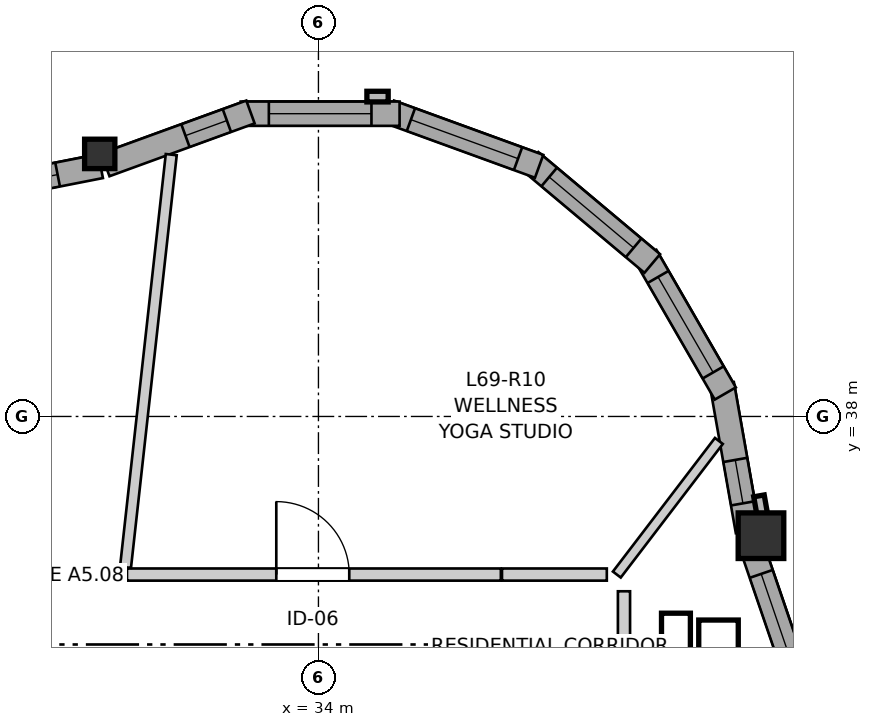
"""IFC4 building model, lengths in metres.
Left out: names, types, materials, properties, quantities, classifications, styles, units other than length and angle.
Written with IfcOpenShell. Run it as: python <this file> out.ifc"""

import sys

from ifc_helpers import new_model, si_unit, direction, frame, frame_2d, origin, origin_2d, place, context, subcontext, project, spatial, rectangle, i_section, extrude, source, transform, mapped, element, fill, save


model = new_model("IFC4")
c1 = context("Model", 3, precision=1e-05, world=origin(), true_north=direction((0.0, 1.0)))
c2 = subcontext(c1, "Body", "Model", "MODEL_VIEW")
j1 = project(units=[si_unit("LENGTHUNIT", "METRE"), si_unit("PLANEANGLEUNIT", "RADIAN")], contexts=[c1])
p1 = place(None, origin())
s1 = spatial("IfcSite", under=j1, at=p1, CompositionType="ELEMENT")
p2 = place(p1, origin())
s2 = spatial("IfcBuilding", under=s1, at=p2, CompositionType="ELEMENT")
p3 = place(p2, frame((0.0, 0.0, 230.8)))
s3 = spatial("IfcBuildingStorey", under=s2, at=p3, CompositionType="ELEMENT", Elevation=230.8)
m1 = source(origin(), c2, "Body", "SweptSolid", [
    extrude(rectangle(XDim=0.6, YDim=0.6, at=origin_2d()), origin(), (0.0, 0.0, 1.0), 2.96),
])
p4 = place(p3, frame((39.823, 36.431, 0.0), z_axis=(0.0, 0.0, 1.0), x_axis=(1.0, 0.0, 0.0)))
e1 = element("IfcColumn", 1, at=p4, inside=s3, PredefinedType="COLUMN", context=c2, shape_type="MappedRepresentation", body=[
    mapped(m1, transform((0.0, 0.0, 0.0), x_axis=(1.0, 0.0, 0.0), y_axis=(0.0, 1.0, 0.0), z_axis=(0.0, 0.0, 1.0), scale=1.0)),
])
m2 = source(origin(), c2, "Body", "SweptSolid", [
    extrude(i_section(OverallWidth=0.398, OverallDepth=0.387, WebThickness=0.019, FlangeThickness=0.03, FilletRadius=0.015, at=origin_2d()), origin(), (0.0, 0.0, 1.0), 2.96),
])
p5 = place(p3, frame((31.123, 41.454, 0.0), z_axis=(0.0, 0.0, 1.0), x_axis=(1.0, 0.0, 0.0)))
e2 = element("IfcColumn", 2, at=p5, inside=s3, PredefinedType="PILASTER", context=c2, shape_type="MappedRepresentation", body=[
    mapped(m2, transform((0.0, 0.0, 0.0), x_axis=(1.0, 0.0, 0.0), y_axis=(0.0, 1.0, 0.0), z_axis=(0.0, 0.0, 1.0), scale=1.0)),
])
p6 = place(p3, frame((40.397, 34.257, 0.0), z_axis=(0.0, 0.0, 1.0), x_axis=(-0.323634249216, 0.9461822619, 0.0)))
e3 = element("IfcWall", 3, at=p6, inside=s3, PredefinedType="SOLIDWALL", context=c2, shape_type="SweptSolid", body=[
    extrude(rectangle(XDim=2.153, YDim=0.32, at=frame_2d((1.077, 0.0))), origin(), (0.0, 0.0, 1.0), 2.58),
])
p7 = place(p6, frame((0.316, 0.0, 0.82)))
e4 = element("IfcOpeningElement", 4, at=p7, cuts=e3, PredefinedType="OPENING", context=c2, shape_type="SweptSolid", body=[
    extrude(rectangle(XDim=1.45, YDim=1.25, at=frame_2d((0.725, 0.625))), frame((0.0, 0.17, 0.0), z_axis=(0.0, -1.0, 0.0), x_axis=(1.0, 0.0, 0.0)), (0.0, 0.0, 1.0), 0.34),
])
p8 = place(p3, frame((39.649, 36.492, 0.0), z_axis=(0.0, 0.0, 1.0), x_axis=(-0.173693060482, 0.984799837906, 0.0)))
e5 = element("IfcWall", 5, at=p8, inside=s3, PredefinedType="SOLIDWALL", context=c2, shape_type="SweptSolid", body=[
    extrude(rectangle(XDim=1.962, YDim=0.32, at=frame_2d((0.981, 0.0))), origin(), (0.0, 0.0, 1.0), 2.58),
])
p9 = place(p8, frame((0.371, 0.0, 0.82)))
e6 = element("IfcOpeningElement", 6, at=p9, cuts=e5, PredefinedType="OPENING", context=c2, shape_type="SweptSolid", body=[
    extrude(rectangle(XDim=0.58, YDim=1.35, at=frame_2d((0.29, 0.675))), frame((0.0, 0.17, 0.0), z_axis=(0.0, -1.0, 0.0), x_axis=(1.0, 0.0, 0.0)), (0.0, 0.0, 1.0), 0.34),
])
p10 = place(p3, frame((39.353, 38.302, 0.0), z_axis=(0.0, 0.0, 1.0), x_axis=(-0.49990781971, 0.866078617559, 0.0)))
e7 = element("IfcWall", 7, at=p10, inside=s3, PredefinedType="SOLIDWALL", context=c2, shape_type="SweptSolid", body=[
    extrude(rectangle(XDim=2.09, YDim=0.32, at=frame_2d((1.045, 0.0))), origin(), (0.0, 0.0, 1.0), 2.58),
])
p11 = place(p10, frame((0.32, 0.0, 0.82)))
e8 = element("IfcOpeningElement", 8, at=p11, cuts=e7, PredefinedType="OPENING", context=c2, shape_type="SweptSolid", body=[
    extrude(rectangle(XDim=1.45, YDim=1.25, at=frame_2d((0.725, 0.625))), frame((0.0, 0.17, 0.0), z_axis=(0.0, -1.0, 0.0), x_axis=(1.0, 0.0, 0.0)), (0.0, 0.0, 1.0), 0.34),
])
p12 = place(p3, frame((38.392, 40.012, 0.0), z_axis=(0.0, 0.0, 1.0), x_axis=(-0.766024572719, 0.642811289563, 0.0)))
e9 = element("IfcWall", 9, at=p12, inside=s3, PredefinedType="SOLIDWALL", context=c2, shape_type="SweptSolid", body=[
    extrude(rectangle(XDim=2.09, YDim=0.32, at=frame_2d((1.045, 0.0))), origin(), (0.0, 0.0, 1.0), 2.58),
])
p13 = place(p12, frame((0.32, 0.0, 0.82)))
e10 = element("IfcOpeningElement", 10, at=p13, cuts=e9, PredefinedType="OPENING", context=c2, shape_type="SweptSolid", body=[
    extrude(rectangle(XDim=1.45, YDim=1.25, at=frame_2d((0.725, 0.625))), frame((0.0, 0.17, 0.0), z_axis=(0.0, -1.0, 0.0), x_axis=(1.0, 0.0, 0.0)), (0.0, 0.0, 1.0), 0.34),
])
p14 = place(p3, frame((36.904, 41.291, 0.0), z_axis=(0.0, 0.0, 1.0), x_axis=(-0.939711556618, 0.341968113072, 0.0)))
e11 = element("IfcWall", 11, at=p14, inside=s3, PredefinedType="SOLIDWALL", context=c2, shape_type="SweptSolid", body=[
    extrude(rectangle(XDim=2.09, YDim=0.32, at=frame_2d((1.045, 0.0))), origin(), (0.0, 0.0, 1.0), 2.58),
])
p15 = place(p14, frame((0.295, 0.0, 0.82)))
e12 = element("IfcOpeningElement", 12, at=p15, cuts=e11, PredefinedType="OPENING", context=c2, shape_type="SweptSolid", body=[
    extrude(rectangle(XDim=1.5, YDim=1.45, at=frame_2d((0.75, 0.725))), frame((0.0, 0.17, 0.0), z_axis=(0.0, -1.0, 0.0), x_axis=(1.0, 0.0, 0.0)), (0.0, 0.0, 1.0), 0.34),
])
p16 = place(p3, frame((35.068, 41.983, 0.0), z_axis=(0.0, 0.0, 1.0), x_axis=(-1.0, 0.0, 0.0)))
e13 = element("IfcWall", 13, at=p16, inside=s3, PredefinedType="SOLIDWALL", context=c2, shape_type="SweptSolid", body=[
    extrude(rectangle(XDim=2.09, YDim=0.32, at=frame_2d((1.045, 0.0))), origin(), (0.0, 0.0, 1.0), 2.58),
])
p17 = place(p16, frame((0.37, 0.0, 0.82)))
e14 = element("IfcOpeningElement", 14, at=p17, cuts=e13, PredefinedType="OPENING", context=c2, shape_type="SweptSolid", body=[
    extrude(rectangle(XDim=1.35, YDim=1.45, at=frame_2d((0.675, 0.725))), frame((0.0, 0.17, 0.0), z_axis=(0.0, -1.0, 0.0), x_axis=(1.0, 0.0, 0.0)), (0.0, 0.0, 1.0), 0.34),
])
p18 = place(p3, frame((33.106, 42.006, 0.0), z_axis=(0.0, 0.0, 1.0), x_axis=(-0.939691662178, -0.342022777067, 0.0)))
e15 = element("IfcWall", 15, at=p18, inside=s3, PredefinedType="SOLIDWALL", context=c2, shape_type="SweptSolid", body=[
    extrude(rectangle(XDim=2.032, YDim=0.32, at=frame_2d((1.016, 0.0))), origin(), (0.0, 0.0, 1.0), 2.58),
])
p19 = place(p18, frame((0.33, 0.0, 0.82)))
e16 = element("IfcOpeningElement", 16, at=p19, cuts=e15, PredefinedType="OPENING", context=c2, shape_type="SweptSolid", body=[
    extrude(rectangle(XDim=0.58, YDim=1.35, at=frame_2d((0.29, 0.675))), frame((0.0, 0.17, 0.0), z_axis=(0.0, -1.0, 0.0), x_axis=(1.0, 0.0, 0.0)), (0.0, 0.0, 1.0), 0.34),
])
p20 = place(p3, frame((31.134, 41.293, 0.0), z_axis=(0.0, 0.0, 1.0), x_axis=(-0.981246594798, -0.19275663464, 0.0)))
e17 = element("IfcWall", 17, at=p20, inside=s3, PredefinedType="SOLIDWALL", context=c2, shape_type="SweptSolid", body=[
    extrude(rectangle(XDim=2.223, YDim=0.32, at=frame_2d((1.111, 0.0))), origin(), (0.0, 0.0, 1.0), 2.58),
])
p21 = place(p20, frame((0.576, 0.0, 0.82)))
e18 = element("IfcOpeningElement", 18, at=p21, cuts=e17, PredefinedType="OPENING", context=c2, shape_type="SweptSolid", body=[
    extrude(rectangle(XDim=1.05, YDim=1.45, at=frame_2d((0.525, 0.725))), frame((0.0, 0.17, 0.0), z_axis=(0.0, -1.0, 0.0), x_axis=(1.0, 0.0, 0.0)), (0.0, 0.0, 1.0), 0.34),
])
p22 = place(p3, frame((26.138, 35.92, 0.0), z_axis=(0.0, 0.0, 1.0), x_axis=(1.0, 0.0, 0.0)))
e19 = element("IfcWall", 19, at=p22, inside=s3, PredefinedType="PARTITIONING", context=c2, shape_type="SweptSolid", body=[
    extrude(rectangle(XDim=5.328, YDim=0.16, at=frame_2d((2.664, 0.0))), origin(), (0.0, 0.0, 1.0), 2.96),
])
p23 = place(p22, frame((2.185, 0.0, 0.0)))
e20 = element("IfcOpeningElement", 20, at=p23, cuts=e19, PredefinedType="OPENING", context=c2, shape_type="SweptSolid", body=[
    extrude(rectangle(XDim=0.96, YDim=2.1, at=frame_2d((0.48, 1.05))), frame((0.0, 0.09, 0.0), z_axis=(0.0, -1.0, 0.0), x_axis=(1.0, 0.0, 0.0)), (0.0, 0.0, 1.0), 0.18),
])
p24 = place(p3, frame((31.481, 35.92, 0.0), z_axis=(0.0, 0.0, 1.0), x_axis=(1.0, 0.0, 0.0)))
e21 = element("IfcWall", 21, at=p24, inside=s3, PredefinedType="PARTITIONING", context=c2, shape_type="SweptSolid", body=[
    extrude(rectangle(XDim=4.919, YDim=0.16, at=frame_2d((2.459, 0.0))), origin(), (0.0, 0.0, 1.0), 2.598),
])
p25 = place(p24, frame((1.965, 0.0, 0.0)))
e22 = element("IfcOpeningElement", 22, at=p25, cuts=e21, PredefinedType="OPENING", context=c2, shape_type="SweptSolid", body=[
    extrude(rectangle(XDim=0.96, YDim=2.1, at=frame_2d((0.48, 1.05))), frame((0.0, 0.09, 0.0), z_axis=(0.0, -1.0, 0.0), x_axis=(1.0, 0.0, 0.0)), (0.0, 0.0, 1.0), 0.18),
])
p26 = place(p3, frame((31.462, 36.016, 0.0), z_axis=(0.0, 0.0, 1.0), x_axis=(0.11018132109, 0.993911503346, 0.0)))
e23 = element("IfcWall", 23, at=p26, inside=s3, PredefinedType="PARTITIONING", context=c2, shape_type="SweptSolid", body=[
    extrude(rectangle(XDim=5.462, YDim=0.145, at=frame_2d((2.731, 0.0))), origin(), (0.0, 0.0, 1.0), 2.96),
])
p27 = place(p3, frame((37.926, 35.92, 0.0), z_axis=(0.0, 0.0, 1.0), x_axis=(0.606987113509, 0.794711673523, 0.0)))
e24 = element("IfcWall", 24, at=p27, inside=s3, PredefinedType="PARTITIONING", context=c2, shape_type="SweptSolid", body=[
    extrude(rectangle(XDim=2.212, YDim=0.13, at=frame_2d((1.106, 0.0))), origin(), (0.0, 0.0, 1.0), 2.96),
])
p28 = place(p3, frame((38.02, 34.315, 0.0), z_axis=(0.0, 0.0, 1.0), x_axis=(0.0, 1.0, 0.0)))
e25 = element("IfcWall", 25, at=p28, inside=s3, PredefinedType="PARTITIONING", context=c2, shape_type="SweptSolid", body=[
    extrude(rectangle(XDim=1.385, YDim=0.16, at=frame_2d((0.693, 0.0))), origin(), (0.0, 0.0, 1.0), 2.96),
])
p29 = place(p3, frame((36.415, 35.92, 0.0), z_axis=(0.0, 0.0, 1.0), x_axis=(1.0, 0.0, 0.0)))
e26 = element("IfcWall", 26, at=p29, inside=s3, PredefinedType="PARTITIONING", context=c2, shape_type="SweptSolid", body=[
    extrude(rectangle(XDim=1.379, YDim=0.16, at=frame_2d((0.689, 0.0))), origin(), (0.0, 0.0, 1.0), 2.598),
])
m3 = source(origin(), c2, "Body", "SweptSolid", [
    extrude(rectangle(XDim=1.45, YDim=1.25, at=frame_2d((0.725, 0.625))), frame((0.0, 0.03, 0.0), z_axis=(0.0, -1.0, 0.0), x_axis=(1.0, 0.0, 0.0)), (0.0, 0.0, 1.0), 0.06),
])
p30 = place(p7, origin())
e27 = element("IfcWindow", 27, at=p30, inside=s3, PartitioningType="SINGLE_PANEL", PredefinedType="WINDOW", context=c2, shape_type="MappedRepresentation", body=[
    mapped(m3, transform((0.0, 0.0, 0.0), x_axis=(1.0, 0.0, 0.0), y_axis=(0.0, 1.0, 0.0), z_axis=(0.0, 0.0, 1.0), scale=1.0)),
])
fill(e4, e27)
m4 = source(origin(), c2, "Body", "SweptSolid", [
    extrude(rectangle(XDim=0.58, YDim=1.35, at=frame_2d((0.29, 0.675))), frame((0.0, 0.03, 0.0), z_axis=(0.0, -1.0, 0.0), x_axis=(1.0, 0.0, 0.0)), (0.0, 0.0, 1.0), 0.06),
])
p31 = place(p9, origin())
e28 = element("IfcWindow", 28, at=p31, inside=s3, PartitioningType="SINGLE_PANEL", PredefinedType="WINDOW", context=c2, shape_type="MappedRepresentation", body=[
    mapped(m4, transform((0.0, 0.0, 0.0), x_axis=(1.0, 0.0, 0.0), y_axis=(0.0, 1.0, 0.0), z_axis=(0.0, 0.0, 1.0), scale=1.0)),
])
fill(e6, e28)
p32 = place(p11, origin())
e29 = element("IfcWindow", 29, at=p32, inside=s3, PartitioningType="SINGLE_PANEL", PredefinedType="WINDOW", context=c2, shape_type="MappedRepresentation", body=[
    mapped(m3, transform((0.0, 0.0, 0.0), x_axis=(1.0, 0.0, 0.0), y_axis=(0.0, 1.0, 0.0), z_axis=(0.0, 0.0, 1.0), scale=1.0)),
])
fill(e8, e29)
p33 = place(p13, origin())
e30 = element("IfcWindow", 30, at=p33, inside=s3, PartitioningType="SINGLE_PANEL", PredefinedType="WINDOW", context=c2, shape_type="MappedRepresentation", body=[
    mapped(m3, transform((0.0, 0.0, 0.0), x_axis=(1.0, 0.0, 0.0), y_axis=(0.0, 1.0, 0.0), z_axis=(0.0, 0.0, 1.0), scale=1.0)),
])
fill(e10, e30)
m5 = source(origin(), c2, "Body", "SweptSolid", [
    extrude(rectangle(XDim=1.5, YDim=1.45, at=frame_2d((0.75, 0.725))), frame((0.0, 0.03, 0.0), z_axis=(0.0, -1.0, 0.0), x_axis=(1.0, 0.0, 0.0)), (0.0, 0.0, 1.0), 0.06),
])
p34 = place(p15, origin())
e31 = element("IfcWindow", 31, at=p34, inside=s3, PartitioningType="SINGLE_PANEL", PredefinedType="WINDOW", context=c2, shape_type="MappedRepresentation", body=[
    mapped(m5, transform((0.0, 0.0, 0.0), x_axis=(1.0, 0.0, 0.0), y_axis=(0.0, 1.0, 0.0), z_axis=(0.0, 0.0, 1.0), scale=1.0)),
])
fill(e12, e31)
m6 = source(origin(), c2, "Body", "SweptSolid", [
    extrude(rectangle(XDim=1.35, YDim=1.45, at=frame_2d((0.675, 0.725))), frame((0.0, 0.03, 0.0), z_axis=(0.0, -1.0, 0.0), x_axis=(1.0, 0.0, 0.0)), (0.0, 0.0, 1.0), 0.06),
])
p35 = place(p17, origin())
e32 = element("IfcWindow", 32, at=p35, inside=s3, PartitioningType="SINGLE_PANEL", PredefinedType="WINDOW", context=c2, shape_type="MappedRepresentation", body=[
    mapped(m6, transform((0.0, 0.0, 0.0), x_axis=(1.0, 0.0, 0.0), y_axis=(0.0, 1.0, 0.0), z_axis=(0.0, 0.0, 1.0), scale=1.0)),
])
fill(e14, e32)
p36 = place(p19, origin())
e33 = element("IfcWindow", 33, at=p36, inside=s3, PartitioningType="SINGLE_PANEL", PredefinedType="WINDOW", context=c2, shape_type="MappedRepresentation", body=[
    mapped(m4, transform((0.0, 0.0, 0.0), x_axis=(1.0, 0.0, 0.0), y_axis=(0.0, 1.0, 0.0), z_axis=(0.0, 0.0, 1.0), scale=1.0)),
])
fill(e16, e33)
m7 = source(origin(), c2, "Body", "SweptSolid", [
    extrude(rectangle(XDim=1.05, YDim=1.45, at=frame_2d((0.525, 0.725))), frame((0.0, 0.03, 0.0), z_axis=(0.0, -1.0, 0.0), x_axis=(1.0, 0.0, 0.0)), (0.0, 0.0, 1.0), 0.06),
])
p37 = place(p21, origin())
e34 = element("IfcWindow", 34, at=p37, inside=s3, PartitioningType="SINGLE_PANEL", PredefinedType="WINDOW", context=c2, shape_type="MappedRepresentation", body=[
    mapped(m7, transform((0.0, 0.0, 0.0), x_axis=(1.0, 0.0, 0.0), y_axis=(0.0, 1.0, 0.0), z_axis=(0.0, 0.0, 1.0), scale=1.0)),
])
fill(e18, e34)
m8 = source(origin(), c2, "Body", "SweptSolid", [
    extrude(rectangle(XDim=0.96, YDim=2.1, at=frame_2d((0.48, 1.05))), frame((0.0, 0.025, 0.0), z_axis=(0.0, -1.0, 0.0), x_axis=(1.0, 0.0, 0.0)), (0.0, 0.0, 1.0), 0.05),
])
p38 = place(p25, origin())
e35 = element("IfcDoor", 35, at=p38, inside=s3, OperationType="SINGLE_SWING_LEFT", PredefinedType="DOOR", context=c2, shape_type="MappedRepresentation", body=[
    mapped(m8, transform((0.0, 0.0, 0.0), x_axis=(1.0, 0.0, 0.0), y_axis=(0.0, 1.0, 0.0), z_axis=(0.0, 0.0, 1.0), scale=1.0)),
])
fill(e22, e35)
save(model, sys.argv[1])
